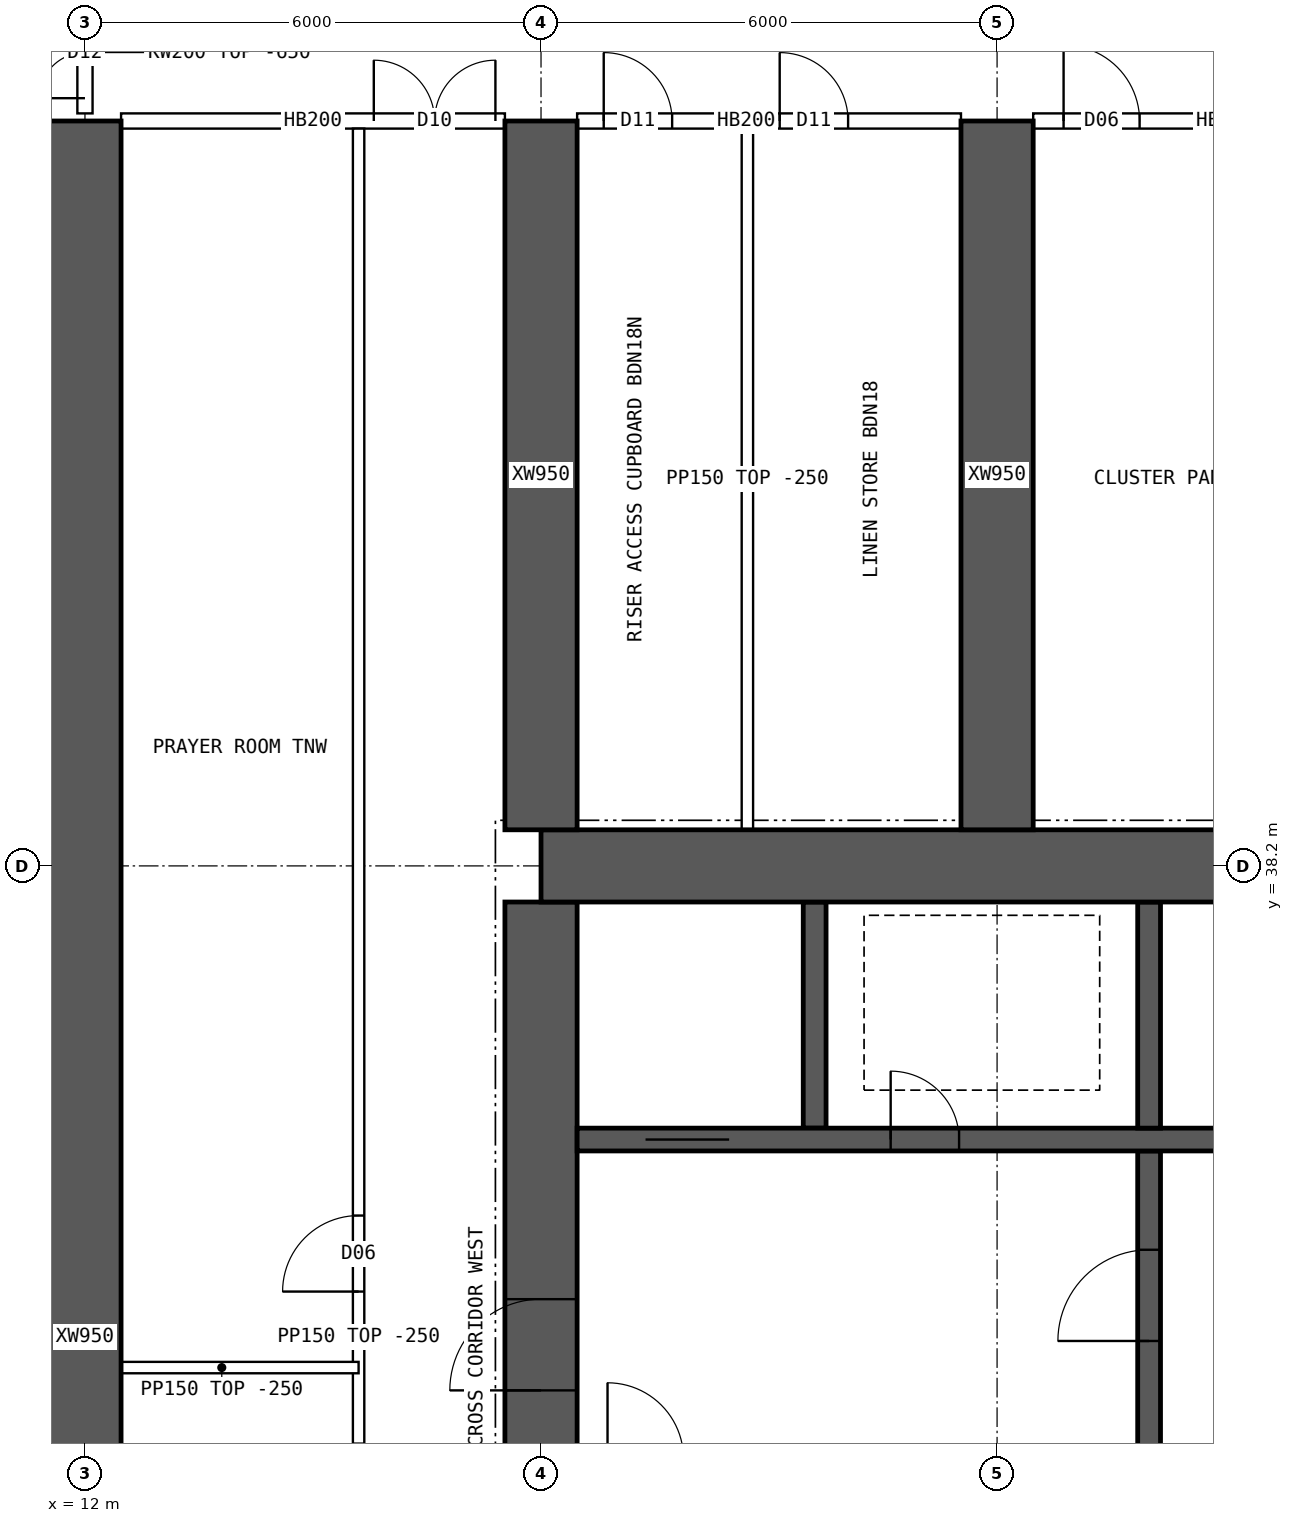
"""IFC4 building model, lengths in metres.
Left out: names, types, materials, properties, quantities, classifications, styles, units other than length and angle.
Written with IfcOpenShell. Run it as: python <this file> out.ifc"""

import sys

from ifc_helpers import new_model, si_unit, direction, frame, frame_2d, origin, place, context, subcontext, project, spatial, polyline, rectangle, outline, extrude, element, fill, save


model = new_model("IFC4")
c1 = context("Model", 3, precision=1e-05, world=origin(), true_north=direction((0.0, 1.0)))
c2 = subcontext(c1, "Body", "Model", "MODEL_VIEW")
j1 = project(units=[si_unit("LENGTHUNIT", "METRE"), si_unit("PLANEANGLEUNIT", "RADIAN")], contexts=[c1])
p1 = place(None, origin())
s1 = spatial("IfcSite", under=j1, at=p1, CompositionType="ELEMENT")
p2 = place(p1, origin())
s2 = spatial("IfcBuilding", under=s1, at=p2, CompositionType="ELEMENT")
p3 = place(p2, frame((0.0, 0.0, 91.9)))
s3 = spatial("IfcBuildingStorey", under=s2, at=p3, CompositionType="ELEMENT", Elevation=91.9)
p4 = place(p3, frame((18.0, 38.2, 0.0), z_axis=(0.0, 0.0, 1.0), x_axis=(1.0, 0.0, 0.0)))
e1 = element("IfcWall", 1, at=p4, inside=s3, PredefinedType="SHEAR", context=c2, shape_type="SweptSolid", body=[
    extrude(rectangle(XDim=48.0, YDim=0.95, at=frame_2d((24.0, 0.0))), origin(), (0.0, 0.0, 1.0), 3.75),
])
p5 = place(p3, frame((18.0, 26.275, 0.0), z_axis=(0.0, 0.0, 1.0), x_axis=(0.0, 1.0, 0.0)))
e2 = element("IfcWall", 2, at=p5, inside=s3, PredefinedType="SHEAR", context=c2, shape_type="SweptSolid", body=[
    extrude(rectangle(XDim=11.45, YDim=0.95, at=frame_2d((5.725, 0.0))), origin(), (0.0, 0.0, 1.0), 3.75),
])
p6 = place(p5, frame((5.025, 0.0, 0.0)))
e3 = element("IfcOpeningElement", 3, at=p6, cuts=e2, PredefinedType="OPENING", context=c2, shape_type="SweptSolid", body=[
    extrude(rectangle(XDim=1.2, YDim=2.1, at=frame_2d((0.6, 1.05))), frame((0.0, 0.485, 0.0), z_axis=(0.0, -1.0, 0.0), x_axis=(1.0, 0.0, 0.0)), (0.0, 0.0, 1.0), 0.97),
])
p7 = place(p3, frame((18.475, 34.6, 0.0), z_axis=(0.0, 0.0, 1.0), x_axis=(1.0, 0.0, 0.0)))
e4 = element("IfcWall", 4, at=p7, inside=s3, PredefinedType="SHEAR", context=c2, shape_type="SweptSolid", body=[
    extrude(rectangle(XDim=47.05, YDim=0.3, at=frame_2d((23.525, 0.0))), origin(), (0.0, 0.0, 1.0), 3.75),
])
p8 = place(p7, frame((0.9, 0.0, 0.0)))
e5 = element("IfcOpeningElement", 5, at=p8, cuts=e4, PredefinedType="OPENING", context=c2, shape_type="SweptSolid", body=[
    extrude(rectangle(XDim=1.1, YDim=2.1, at=frame_2d((0.55, 1.05))), frame((0.0, 0.16, 0.0), z_axis=(0.0, -1.0, 0.0), x_axis=(1.0, 0.0, 0.0)), (0.0, 0.0, 1.0), 0.32),
])
p9 = place(p7, frame((45.05, 0.0, 0.0)))
e6 = element("IfcOpeningElement", 6, at=p9, cuts=e4, PredefinedType="OPENING", context=c2, shape_type="SweptSolid", body=[
    extrude(rectangle(XDim=1.1, YDim=2.1, at=frame_2d((0.55, 1.05))), frame((0.0, 0.16, 0.0), z_axis=(0.0, -1.0, 0.0), x_axis=(1.0, 0.0, 0.0)), (0.0, 0.0, 1.0), 0.32),
])
p10 = place(p7, frame((4.125, 0.0, 0.0)))
e7 = element("IfcOpeningElement", 7, at=p10, cuts=e4, PredefinedType="OPENING", context=c2, shape_type="SweptSolid", body=[
    extrude(rectangle(XDim=0.9, YDim=2.1, at=frame_2d((0.45, 1.05))), frame((0.0, 0.16, 0.0), z_axis=(0.0, -1.0, 0.0), x_axis=(1.0, 0.0, 0.0)), (0.0, 0.0, 1.0), 0.32),
])
p11 = place(p7, frame((42.025, 0.0, 0.0)))
e8 = element("IfcOpeningElement", 8, at=p11, cuts=e4, PredefinedType="OPENING", context=c2, shape_type="SweptSolid", body=[
    extrude(rectangle(XDim=0.9, YDim=2.1, at=frame_2d((0.45, 1.05))), frame((0.0, 0.16, 0.0), z_axis=(0.0, -1.0, 0.0), x_axis=(1.0, 0.0, 0.0)), (0.0, 0.0, 1.0), 0.32),
])
p12 = place(p7, frame((8.9, 0.0, 0.0)))
e9 = element("IfcOpeningElement", 9, at=p12, cuts=e4, PredefinedType="OPENING", context=c2, shape_type="SweptSolid", body=[
    extrude(rectangle(XDim=0.9, YDim=2.1, at=frame_2d((0.45, 1.05))), frame((0.0, 0.16, 0.0), z_axis=(0.0, -1.0, 0.0), x_axis=(1.0, 0.0, 0.0)), (0.0, 0.0, 1.0), 0.32),
])
p13 = place(p7, frame((12.874, 0.0, 0.0)))
e10 = element("IfcOpeningElement", 10, at=p13, cuts=e4, PredefinedType="OPENING", context=c2, shape_type="SweptSolid", body=[
    extrude(rectangle(XDim=0.9, YDim=2.1, at=frame_2d((0.45, 1.05))), frame((0.0, 0.16, 0.0), z_axis=(0.0, -1.0, 0.0), x_axis=(1.0, 0.0, 0.0)), (0.0, 0.0, 1.0), 0.32),
])
p14 = place(p7, frame((16.521, 0.0, 0.0)))
e11 = element("IfcOpeningElement", 11, at=p14, cuts=e4, PredefinedType="OPENING", context=c2, shape_type="SweptSolid", body=[
    extrude(rectangle(XDim=0.9, YDim=2.1, at=frame_2d((0.45, 1.05))), frame((0.0, 0.16, 0.0), z_axis=(0.0, -1.0, 0.0), x_axis=(1.0, 0.0, 0.0)), (0.0, 0.0, 1.0), 0.32),
])
p15 = place(p7, frame((20.28, 0.0, 0.0)))
e12 = element("IfcOpeningElement", 12, at=p15, cuts=e4, PredefinedType="OPENING", context=c2, shape_type="SweptSolid", body=[
    extrude(rectangle(XDim=0.9, YDim=2.1, at=frame_2d((0.45, 1.05))), frame((0.0, 0.16, 0.0), z_axis=(0.0, -1.0, 0.0), x_axis=(1.0, 0.0, 0.0)), (0.0, 0.0, 1.0), 0.32),
])
p16 = place(p7, frame((24.686, 0.0, 0.0)))
e13 = element("IfcOpeningElement", 13, at=p16, cuts=e4, PredefinedType="OPENING", context=c2, shape_type="SweptSolid", body=[
    extrude(rectangle(XDim=0.9, YDim=2.1, at=frame_2d((0.45, 1.05))), frame((0.0, 0.16, 0.0), z_axis=(0.0, -1.0, 0.0), x_axis=(1.0, 0.0, 0.0)), (0.0, 0.0, 1.0), 0.32),
])
p17 = place(p7, frame((27.483, 0.0, 0.0)))
e14 = element("IfcOpeningElement", 14, at=p17, cuts=e4, PredefinedType="OPENING", context=c2, shape_type="SweptSolid", body=[
    extrude(rectangle(XDim=0.9, YDim=2.1, at=frame_2d((0.45, 1.05))), frame((0.0, 0.16, 0.0), z_axis=(0.0, -1.0, 0.0), x_axis=(1.0, 0.0, 0.0)), (0.0, 0.0, 1.0), 0.32),
])
p18 = place(p7, frame((30.666, 0.0, 0.0)))
e15 = element("IfcOpeningElement", 15, at=p18, cuts=e4, PredefinedType="OPENING", context=c2, shape_type="SweptSolid", body=[
    extrude(rectangle(XDim=0.9, YDim=2.1, at=frame_2d((0.45, 1.05))), frame((0.0, 0.16, 0.0), z_axis=(0.0, -1.0, 0.0), x_axis=(1.0, 0.0, 0.0)), (0.0, 0.0, 1.0), 0.32),
])
p19 = place(p7, frame((34.617, 0.0, 0.0)))
e16 = element("IfcOpeningElement", 16, at=p19, cuts=e4, PredefinedType="OPENING", context=c2, shape_type="SweptSolid", body=[
    extrude(rectangle(XDim=0.9, YDim=2.1, at=frame_2d((0.45, 1.05))), frame((0.0, 0.16, 0.0), z_axis=(0.0, -1.0, 0.0), x_axis=(1.0, 0.0, 0.0)), (0.0, 0.0, 1.0), 0.32),
])
p20 = place(p7, frame((37.555, 0.0, 0.0)))
e17 = element("IfcOpeningElement", 17, at=p20, cuts=e4, PredefinedType="OPENING", context=c2, shape_type="SweptSolid", body=[
    extrude(rectangle(XDim=0.9, YDim=2.1, at=frame_2d((0.45, 1.05))), frame((0.0, 0.16, 0.0), z_axis=(0.0, -1.0, 0.0), x_axis=(1.0, 0.0, 0.0)), (0.0, 0.0, 1.0), 0.32),
])
p21 = place(p3, frame((26.0, 30.55, 0.0), z_axis=(0.0, 0.0, 1.0), x_axis=(0.0, 1.0, 0.0)))
e18 = element("IfcWall", 18, at=p21, inside=s3, PredefinedType="SHEAR", context=c2, shape_type="SweptSolid", body=[
    extrude(rectangle(XDim=3.9, YDim=0.3, at=frame_2d((1.95, 0.0))), origin(), (0.0, 0.0, 1.0), 3.75),
])
p22 = place(p21, frame((1.4, 0.0, 0.0)))
e19 = element("IfcOpeningElement", 19, at=p22, cuts=e18, PredefinedType="OPENING", context=c2, shape_type="SweptSolid", body=[
    extrude(rectangle(XDim=1.2, YDim=2.1, at=frame_2d((0.6, 1.05))), frame((0.0, 0.16, 0.0), z_axis=(0.0, -1.0, 0.0), x_axis=(1.0, 0.0, 0.0)), (0.0, 0.0, 1.0), 0.32),
])
for number, where, z_axis, x_axis in (
    (20, (21.6, 34.75, 0.0), (0.0, 0.0, 1.0), (0.0, 1.0, 0.0)),
    (21, (26.0, 34.75, 0.0), (0.0, 0.0, 1.0), (0.0, 1.0, 0.0)),
):
    element("IfcWall", number, at=place(p3, frame(where, z_axis=z_axis, x_axis=x_axis)), inside=s3, PredefinedType="SHEAR", context=c2, shape_type="SweptSolid", body=[
        extrude(rectangle(XDim=2.975, YDim=0.3, at=frame_2d((1.488, 0.0))), origin(), (0.0, 0.0, 1.0), 3.75),
    ])
p23 = place(p3, frame((12.0, 16.0, 0.0), z_axis=(0.0, 0.0, 1.0), x_axis=(0.0, 1.0, 0.0)))
e22 = element("IfcWall", 22, at=p23, inside=s3, PredefinedType="SHEAR", context=c2, shape_type="SweptSolid", body=[
    extrude(rectangle(XDim=32.0, YDim=0.95, at=frame_2d((16.0, 0.0))), origin(), (0.0, 0.0, 1.0), 3.75),
])
for number, where, z_axis, x_axis in (
    (23, (18.0, 38.675, 0.0), (0.0, 0.0, 1.0), (0.0, 1.0, 0.0)),
    (24, (24.0, 38.675, 0.0), (0.0, 0.0, 1.0), (0.0, 1.0, 0.0)),
):
    element("IfcWall", number, at=place(p3, frame(where, z_axis=z_axis, x_axis=x_axis)), inside=s3, PredefinedType="SHEAR", context=c2, shape_type="SweptSolid", body=[
        extrude(rectangle(XDim=9.325, YDim=0.95, at=frame_2d((4.663, 0.0))), origin(), (0.0, 0.0, 1.0), 3.75),
    ])
p24 = place(p3, frame((12.475, 48.0, 0.0), z_axis=(0.0, 0.0, 1.0), x_axis=(1.0, 0.0, 0.0)))
e25 = element("IfcWall", 25, at=p24, inside=s3, PredefinedType="SOLIDWALL", context=c2, shape_type="SweptSolid", body=[
    extrude(rectangle(XDim=5.05, YDim=0.2, at=frame_2d((2.525, 0.0))), origin(), (0.0, 0.0, 1.0), 3.5),
])
p25 = place(p24, frame((3.325, 0.0, 0.0)))
e26 = element("IfcOpeningElement", 26, at=p25, cuts=e25, PredefinedType="OPENING", context=c2, shape_type="SweptSolid", body=[
    extrude(rectangle(XDim=1.6, YDim=2.1, at=frame_2d((0.8, 1.05))), frame((0.0, 0.11, 0.0), z_axis=(0.0, -1.0, 0.0), x_axis=(1.0, 0.0, 0.0)), (0.0, 0.0, 1.0), 0.22),
])
p26 = place(p3, frame((18.475, 48.0, 0.0), z_axis=(0.0, 0.0, 1.0), x_axis=(1.0, 0.0, 0.0)))
e27 = element("IfcWall", 27, at=p26, inside=s3, PredefinedType="SOLIDWALL", context=c2, shape_type="SweptSolid", body=[
    extrude(rectangle(XDim=5.05, YDim=0.2, at=frame_2d((2.525, 0.0))), origin(), (0.0, 0.0, 1.0), 3.5),
])
p27 = place(p26, frame((0.35, 0.0, 0.0)))
e28 = element("IfcOpeningElement", 28, at=p27, cuts=e27, PredefinedType="OPENING", context=c2, shape_type="SweptSolid", body=[
    extrude(rectangle(XDim=0.9, YDim=2.1, at=frame_2d((0.45, 1.05))), frame((0.0, 0.11, 0.0), z_axis=(0.0, -1.0, 0.0), x_axis=(1.0, 0.0, 0.0)), (0.0, 0.0, 1.0), 0.22),
])
p28 = place(p26, frame((2.665, 0.0, 0.0)))
e29 = element("IfcOpeningElement", 29, at=p28, cuts=e27, PredefinedType="OPENING", context=c2, shape_type="SweptSolid", body=[
    extrude(rectangle(XDim=0.9, YDim=2.1, at=frame_2d((0.45, 1.05))), frame((0.0, 0.11, 0.0), z_axis=(0.0, -1.0, 0.0), x_axis=(1.0, 0.0, 0.0)), (0.0, 0.0, 1.0), 0.22),
])
p29 = place(p3, frame((24.475, 48.0, 0.0), z_axis=(0.0, 0.0, 1.0), x_axis=(1.0, 0.0, 0.0)))
e30 = element("IfcWall", 30, at=p29, inside=s3, PredefinedType="SOLIDWALL", context=c2, shape_type="SweptSolid", body=[
    extrude(rectangle(XDim=5.05, YDim=0.2, at=frame_2d((2.525, 0.0))), origin(), (0.0, 0.0, 1.0), 3.5),
])
p30 = place(p29, frame((0.4, 0.0, 0.0)))
e31 = element("IfcOpeningElement", 31, at=p30, cuts=e30, PredefinedType="OPENING", context=c2, shape_type="SweptSolid", body=[
    extrude(rectangle(XDim=1.0, YDim=2.1, at=frame_2d((0.5, 1.05))), frame((0.0, 0.11, 0.0), z_axis=(0.0, -1.0, 0.0), x_axis=(1.0, 0.0, 0.0)), (0.0, 0.0, 1.0), 0.22),
])
p31 = place(p3, frame((20.715, 38.675, 0.0), z_axis=(0.0, 0.0, 1.0), x_axis=(0.0, 1.0, 0.0)))
e32 = element("IfcWall", 32, at=p31, inside=s3, PredefinedType="PARTITIONING", context=c2, shape_type="SweptSolid", body=[
    extrude(rectangle(XDim=9.225, YDim=0.15, at=frame_2d((4.612, 0.0))), origin(), (0.0, 0.0, 1.0), 3.5),
])
p32 = place(p3, frame((15.6, 16.1, 0.0), z_axis=(0.0, 0.0, 1.0), x_axis=(0.0, 1.0, 0.0)))
e33 = element("IfcWall", 33, at=p32, inside=s3, PredefinedType="PARTITIONING", context=c2, shape_type="SweptSolid", body=[
    extrude(rectangle(XDim=31.8, YDim=0.15, at=frame_2d((15.9, 0.0))), origin(), (0.0, 0.0, 1.0), 3.5),
])
p33 = place(p32, frame((13.5, 0.0, 0.0)))
e34 = element("IfcOpeningElement", 34, at=p33, cuts=e33, PredefinedType="OPENING", context=c2, shape_type="SweptSolid", body=[
    extrude(rectangle(XDim=1.0, YDim=2.1, at=frame_2d((0.5, 1.05))), frame((0.0, 0.085, 0.0), z_axis=(0.0, -1.0, 0.0), x_axis=(1.0, 0.0, 0.0)), (0.0, 0.0, 1.0), 0.17),
])
p34 = place(p32, frame((16.5, 0.0, 0.0)))
e35 = element("IfcOpeningElement", 35, at=p34, cuts=e33, PredefinedType="OPENING", context=c2, shape_type="SweptSolid", body=[
    extrude(rectangle(XDim=1.0, YDim=2.1, at=frame_2d((0.5, 1.05))), frame((0.0, 0.085, 0.0), z_axis=(0.0, -1.0, 0.0), x_axis=(1.0, 0.0, 0.0)), (0.0, 0.0, 1.0), 0.17),
])
p35 = place(p3, frame((12.0, 31.6, 0.0), z_axis=(0.0, 0.0, 1.0), x_axis=(1.0, 0.0, 0.0)))
e36 = element("IfcWall", 36, at=p35, inside=s3, PredefinedType="PARTITIONING", context=c2, shape_type="SweptSolid", body=[
    extrude(rectangle(XDim=3.6, YDim=0.15, at=frame_2d((1.8, 0.0))), origin(), (0.0, 0.0, 1.0), 3.5),
])
p36 = place(p3, frame((3.905, 30.85, 0.0), z_axis=(0.0, 0.0, 1.0), x_axis=(1.0, 0.0, 0.0)))
e37 = element("IfcWall", 37, at=p36, inside=s3, PredefinedType="PARTITIONING", context=c2, shape_type="SweptSolid", body=[
    extrude(outline(polyline([(0.0, 0.0), (8.02, 0.0), (8.02, 3.5), (2.397, 3.5), (2.395, 3.05), (1.797, 3.05), (1.795, 3.5), (0.0, 3.5), (0.0, 0.0)])), frame((0.0, 0.075, 0.0), z_axis=(0.0, -1.0, 0.0), x_axis=(1.0, 0.0, 0.0)), (0.0, 0.0, 1.0), 0.15),
])
p37 = place(p3, frame((12.0, 48.1, 0.0), z_axis=(0.0, 0.0, 1.0), x_axis=(0.0, 1.0, 0.0)))
e38 = element("IfcWall", 38, at=p37, inside=s3, PredefinedType="SOLIDWALL", context=c2, shape_type="SweptSolid", body=[
    extrude(outline(polyline([(0.0, 0.0), (1.6, 0.0), (1.6, 3.1), (0.0, 3.1), (0.0, 0.0)])), frame((0.0, 0.1, 0.0), z_axis=(0.0, -1.0, 0.0), x_axis=(1.0, 0.0, 0.0)), (0.0, 0.0, 1.0), 0.2),
])
p38 = place(p37, frame((0.2, 0.0, 0.0)))
e39 = element("IfcOpeningElement", 39, at=p38, cuts=e38, PredefinedType="OPENING", context=c2, shape_type="SweptSolid", body=[
    extrude(rectangle(XDim=1.2, YDim=2.1, at=frame_2d((0.6, 1.05))), frame((0.0, 0.11, 0.0), z_axis=(0.0, -1.0, 0.0), x_axis=(1.0, 0.0, 0.0)), (0.0, 0.0, 1.0), 0.22),
])
p39 = place(p6, origin())
e40 = element("IfcDoor", 40, at=p39, inside=s3, OperationType="SINGLE_SWING_LEFT", PredefinedType="DOOR", context=c2, shape_type="SweptSolid", body=[
    extrude(rectangle(XDim=1.2, YDim=2.1, at=frame_2d((0.6, 1.05))), frame((0.0, 0.025, 0.0), z_axis=(0.0, -1.0, 0.0), x_axis=(1.0, 0.0, 0.0)), (0.0, 0.0, 1.0), 0.05),
])
fill(e3, e40)
p40 = place(p8, origin())
e41 = element("IfcDoor", 41, at=p40, inside=s3, OperationType="DOUBLE_DOOR_SLIDING", PredefinedType="DOOR", context=c2, shape_type="SweptSolid", body=[
    extrude(rectangle(XDim=1.1, YDim=2.1, at=frame_2d((0.55, 1.05))), frame((0.0, 0.025, 0.0), z_axis=(0.0, -1.0, 0.0), x_axis=(1.0, 0.0, 0.0)), (0.0, 0.0, 1.0), 0.05),
])
fill(e5, e41)
p41 = place(p10, origin())
e42 = element("IfcDoor", 42, at=p41, inside=s3, OperationType="SINGLE_SWING_LEFT", PredefinedType="DOOR", context=c2, shape_type="SweptSolid", body=[
    extrude(rectangle(XDim=0.9, YDim=2.1, at=frame_2d((0.45, 1.05))), frame((0.0, 0.025, 0.0), z_axis=(0.0, -1.0, 0.0), x_axis=(1.0, 0.0, 0.0)), (0.0, 0.0, 1.0), 0.05),
])
fill(e7, e42)
p42 = place(p22, origin())
e43 = element("IfcDoor", 43, at=p42, inside=s3, OperationType="SINGLE_SWING_LEFT", PredefinedType="DOOR", context=c2, shape_type="SweptSolid", body=[
    extrude(rectangle(XDim=1.2, YDim=2.1, at=frame_2d((0.6, 1.05))), frame((0.0, 0.025, 0.0), z_axis=(0.0, -1.0, 0.0), x_axis=(1.0, 0.0, 0.0)), (0.0, 0.0, 1.0), 0.05),
])
fill(e19, e43)
p43 = place(p25, origin())
e44 = element("IfcDoor", 44, at=p43, inside=s3, OperationType="DOUBLE_DOOR_SINGLE_SWING", PredefinedType="DOOR", context=c2, shape_type="SweptSolid", body=[
    extrude(rectangle(XDim=1.6, YDim=2.1, at=frame_2d((0.8, 1.05))), frame((0.0, 0.025, 0.0), z_axis=(0.0, -1.0, 0.0), x_axis=(1.0, 0.0, 0.0)), (0.0, 0.0, 1.0), 0.05),
])
fill(e26, e44)
p44 = place(p27, origin())
e45 = element("IfcDoor", 45, at=p44, inside=s3, OperationType="SINGLE_SWING_LEFT", PredefinedType="DOOR", context=c2, shape_type="SweptSolid", body=[
    extrude(rectangle(XDim=0.9, YDim=2.1, at=frame_2d((0.45, 1.05))), frame((0.0, 0.025, 0.0), z_axis=(0.0, -1.0, 0.0), x_axis=(1.0, 0.0, 0.0)), (0.0, 0.0, 1.0), 0.05),
])
fill(e28, e45)
p45 = place(p28, origin())
e46 = element("IfcDoor", 46, at=p45, inside=s3, OperationType="SINGLE_SWING_LEFT", PredefinedType="DOOR", context=c2, shape_type="SweptSolid", body=[
    extrude(rectangle(XDim=0.9, YDim=2.1, at=frame_2d((0.45, 1.05))), frame((0.0, 0.025, 0.0), z_axis=(0.0, -1.0, 0.0), x_axis=(1.0, 0.0, 0.0)), (0.0, 0.0, 1.0), 0.05),
])
fill(e29, e46)
p46 = place(p30, origin())
e47 = element("IfcDoor", 47, at=p46, inside=s3, OperationType="SINGLE_SWING_LEFT", PredefinedType="DOOR", context=c2, shape_type="SweptSolid", body=[
    extrude(rectangle(XDim=1.0, YDim=2.1, at=frame_2d((0.5, 1.05))), frame((0.0, 0.025, 0.0), z_axis=(0.0, -1.0, 0.0), x_axis=(1.0, 0.0, 0.0)), (0.0, 0.0, 1.0), 0.05),
])
fill(e31, e47)
p47 = place(p34, origin())
e48 = element("IfcDoor", 48, at=p47, inside=s3, OperationType="SINGLE_SWING_LEFT", PredefinedType="DOOR", context=c2, shape_type="SweptSolid", body=[
    extrude(rectangle(XDim=1.0, YDim=2.1, at=frame_2d((0.5, 1.05))), frame((0.0, 0.025, 0.0), z_axis=(0.0, -1.0, 0.0), x_axis=(1.0, 0.0, 0.0)), (0.0, 0.0, 1.0), 0.05),
])
fill(e35, e48)
p48 = place(p38, origin())
e49 = element("IfcDoor", 49, at=p48, inside=s3, OperationType="DOUBLE_DOOR_SINGLE_SWING", PredefinedType="DOOR", context=c2, shape_type="SweptSolid", body=[
    extrude(rectangle(XDim=1.2, YDim=2.1, at=frame_2d((0.6, 1.05))), frame((0.0, 0.025, 0.0), z_axis=(0.0, -1.0, 0.0), x_axis=(1.0, 0.0, 0.0)), (0.0, 0.0, 1.0), 0.05),
])
fill(e39, e49)
save(model, sys.argv[1])
